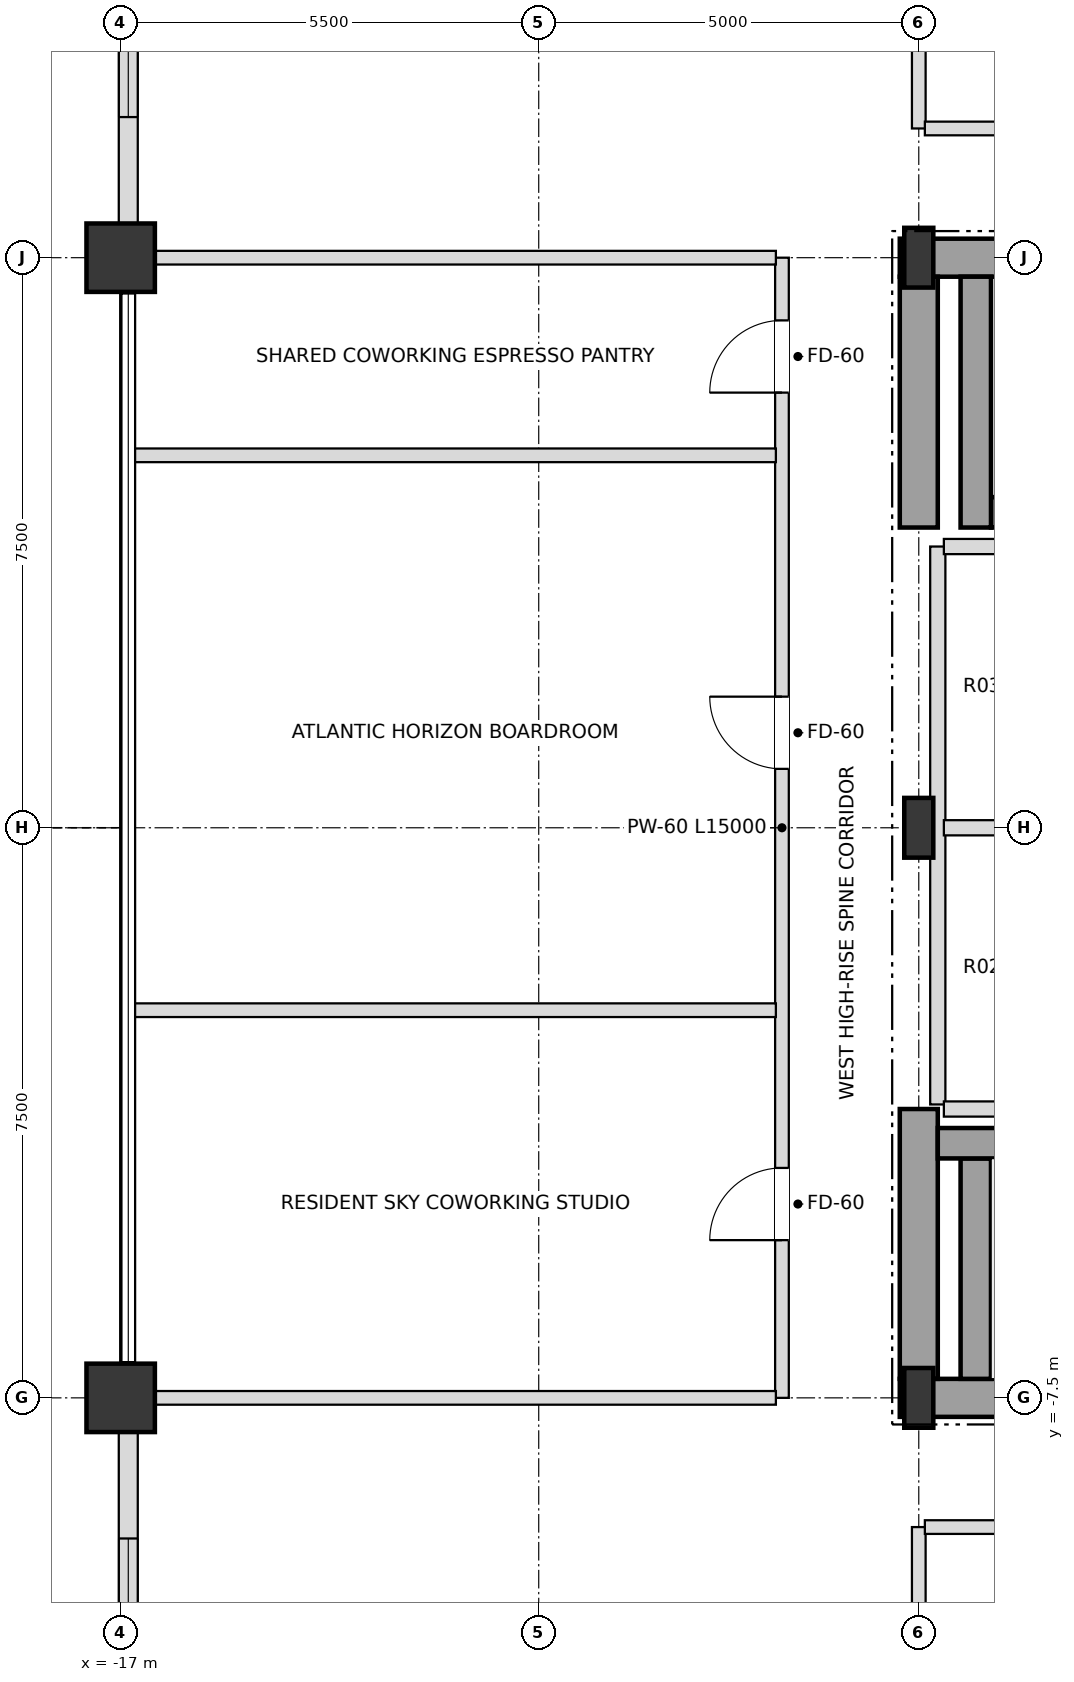
"""IFC4 building model, lengths in metres.
Left out: names, types, materials, properties, quantities, classifications, styles, units other than length and angle.
Written with IfcOpenShell. Run it as: python <this file> out.ifc"""

import sys

from ifc_helpers import new_model, si_unit, direction, frame, frame_2d, origin, origin_2d, place, context, subcontext, project, spatial, rectangle, i_section, extrude, element, fill, save


model = new_model("IFC4")
c1 = context("Model", 3, precision=1e-05, world=origin(), true_north=direction((0.0, 1.0)))
c2 = subcontext(c1, "Body", "Model", "MODEL_VIEW")
j1 = project(units=[si_unit("LENGTHUNIT", "METRE"), si_unit("PLANEANGLEUNIT", "RADIAN")], contexts=[c1])
p1 = place(None, origin())
s1 = spatial("IfcSite", under=j1, at=p1, CompositionType="ELEMENT")
p2 = place(p1, origin())
s2 = spatial("IfcBuilding", under=s1, at=p2, CompositionType="ELEMENT")
p3 = place(p2, frame((0.0, 0.0, 272.7)))
s3 = spatial("IfcBuildingStorey", under=s2, at=p3, CompositionType="ELEMENT", Elevation=272.7)
for number, where, z_axis, x_axis in (
    (1, (-6.5, -7.5, 0.0), (0.0, 0.0, 1.0), (1.0, 0.0, 0.0)),
    (2, (-6.5, 0.0, 0.0), (0.0, 0.0, 1.0), (1.0, 0.0, 0.0)),
    (3, (-6.5, 7.5, 0.0), (0.0, 0.0, 1.0), (1.0, 0.0, 0.0)),
):
    element("IfcColumn", number, at=place(p3, frame(where, z_axis=z_axis, x_axis=x_axis)), inside=s3, PredefinedType="COLUMN", context=c2, shape_type="SweptSolid", body=[
        extrude(i_section(OverallWidth=0.382, OverallDepth=0.786, WebThickness=0.02, FlangeThickness=0.033, at=origin_2d()), origin(), (0.0, 0.0, 1.0), 3.6),
    ])
for number, where, z_axis, x_axis in (
    (4, (-17.0, 7.5, 0.0), (0.0, 0.0, 1.0), (1.0, 0.0, 0.0)),
    (5, (-17.0, -7.5, 0.0), (0.0, 0.0, 1.0), (1.0, 0.0, 0.0)),
):
    element("IfcColumn", number, at=place(p3, frame(where, z_axis=z_axis, x_axis=x_axis)), inside=s3, PredefinedType="USERDEFINED", context=c2, shape_type="SweptSolid", body=[
        extrude(rectangle(XDim=0.9, YDim=0.9, at=origin_2d()), origin(), (0.0, 0.0, 1.0), 3.6),
    ])
p4 = place(p3, frame((-16.9, 12.555, 0.0), z_axis=(0.0, 0.0, 1.0), x_axis=(0.0, -1.0, 0.0)))
e6 = element("IfcWall", 6, at=p4, inside=s3, PredefinedType="SOLIDWALL", context=c2, shape_type="SweptSolid", body=[
    extrude(rectangle(XDim=4.61, YDim=0.25, at=frame_2d((2.305, 0.0))), origin(), (0.0, 0.0, 1.0), 2.748),
])
p5 = place(p4, frame((1.405, 0.0, 0.72)))
e7 = element("IfcOpeningElement", 7, at=p5, cuts=e6, PredefinedType="OPENING", context=c2, shape_type="SweptSolid", body=[
    extrude(rectangle(XDim=1.8, YDim=1.68, at=frame_2d((0.9, 0.84))), frame((0.0, 0.135, 0.0), z_axis=(0.0, -1.0, 0.0), x_axis=(1.0, 0.0, 0.0)), (0.0, 0.0, 1.0), 0.27),
])
p6 = place(p3, frame((-16.9, -7.945, 0.0), z_axis=(0.0, 0.0, 1.0), x_axis=(0.0, -1.0, 0.0)))
e8 = element("IfcWall", 8, at=p6, inside=s3, PredefinedType="SOLIDWALL", context=c2, shape_type="SweptSolid", body=[
    extrude(rectangle(XDim=4.61, YDim=0.25, at=frame_2d((2.305, 0.0))), origin(), (0.0, 0.0, 1.0), 2.748),
])
p7 = place(p6, frame((1.405, 0.0, 0.72)))
e9 = element("IfcOpeningElement", 9, at=p7, cuts=e8, PredefinedType="OPENING", context=c2, shape_type="SweptSolid", body=[
    extrude(rectangle(XDim=1.8, YDim=1.68, at=frame_2d((0.9, 0.84))), frame((0.0, 0.135, 0.0), z_axis=(0.0, -1.0, 0.0), x_axis=(1.0, 0.0, 0.0)), (0.0, 0.0, 1.0), 0.27),
])
p8 = place(p3, frame((-6.75, -7.5, 0.0), z_axis=(0.0, 0.0, 1.0), x_axis=(1.0, 0.0, 0.0)))
e10 = element("IfcWall", 10, at=p8, inside=s3, PredefinedType="SHEAR", context=c2, shape_type="SweptSolid", body=[
    extrude(rectangle(XDim=6.75, YDim=0.5, at=frame_2d((3.375, 0.0))), origin(), (0.0, 0.0, 1.0), 3.38),
])
p9 = place(p3, frame((-6.75, 7.5, 0.0), z_axis=(0.0, 0.0, 1.0), x_axis=(1.0, 0.0, 0.0)))
e11 = element("IfcWall", 11, at=p9, inside=s3, PredefinedType="SHEAR", context=c2, shape_type="SweptSolid", body=[
    extrude(rectangle(XDim=6.75, YDim=0.5, at=frame_2d((3.375, 0.0))), origin(), (0.0, 0.0, 1.0), 3.38),
])
p10 = place(p9, frame((1.65, 0.0, 0.0)))
e12 = element("IfcOpeningElement", 12, at=p10, cuts=e11, PredefinedType="OPENING", context=c2, shape_type="SweptSolid", body=[
    extrude(rectangle(XDim=1.05, YDim=2.15, at=frame_2d((0.525, 1.075))), frame((0.0, 0.26, 0.0), z_axis=(0.0, -1.0, 0.0), x_axis=(1.0, 0.0, 0.0)), (0.0, 0.0, 1.0), 0.52),
])
p11 = place(p3, frame((-6.5, -7.25, 0.0), z_axis=(0.0, 0.0, 1.0), x_axis=(0.0, 1.0, 0.0)))
e13 = element("IfcWall", 13, at=p11, inside=s3, PredefinedType="SHEAR", context=c2, shape_type="SweptSolid", body=[
    extrude(rectangle(XDim=3.55, YDim=0.5, at=frame_2d((1.775, 0.0))), origin(), (0.0, 0.0, 1.0), 3.38),
])
p12 = place(p3, frame((-6.5, 3.95, 0.0), z_axis=(0.0, 0.0, 1.0), x_axis=(0.0, 1.0, 0.0)))
e14 = element("IfcWall", 14, at=p12, inside=s3, PredefinedType="SHEAR", context=c2, shape_type="SweptSolid", body=[
    extrude(rectangle(XDim=3.3, YDim=0.5, at=frame_2d((1.65, 0.0))), origin(), (0.0, 0.0, 1.0), 3.38),
])
p13 = place(p3, frame((-5.75, -7.25, 0.0), z_axis=(0.0, 0.0, 1.0), x_axis=(0.0, 1.0, 0.0)))
e15 = element("IfcWall", 15, at=p13, inside=s3, PredefinedType="SHEAR", context=c2, shape_type="SweptSolid", body=[
    extrude(rectangle(XDim=2.9, YDim=0.4, at=frame_2d((1.45, 0.0))), origin(), (0.0, 0.0, 1.0), 3.38),
])
p14 = place(p3, frame((-6.25, -4.15, 0.0), z_axis=(0.0, 0.0, 1.0), x_axis=(1.0, 0.0, 0.0)))
e16 = element("IfcWall", 16, at=p14, inside=s3, PredefinedType="SHEAR", context=c2, shape_type="SweptSolid", body=[
    extrude(rectangle(XDim=7.78, YDim=0.4, at=frame_2d((3.89, 0.0))), origin(), (0.0, 0.0, 1.0), 3.38),
])
p15 = place(p3, frame((-5.55, 4.15, 0.0), z_axis=(0.0, 0.0, 1.0), x_axis=(1.0, 0.0, 0.0)))
e17 = element("IfcWall", 17, at=p15, inside=s3, PredefinedType="SHEAR", context=c2, shape_type="SweptSolid", body=[
    extrude(rectangle(XDim=7.08, YDim=0.4, at=frame_2d((3.54, 0.0))), origin(), (0.0, 0.0, 1.0), 3.38),
])
p16 = place(p3, frame((-5.75, 3.95, 0.0), z_axis=(0.0, 0.0, 1.0), x_axis=(0.0, 1.0, 0.0)))
e18 = element("IfcWall", 18, at=p16, inside=s3, PredefinedType="SHEAR", context=c2, shape_type="SweptSolid", body=[
    extrude(rectangle(XDim=3.3, YDim=0.4, at=frame_2d((1.65, 0.0))), origin(), (0.0, 0.0, 1.0), 3.38),
])
p17 = place(p3, frame((-8.3, -7.5, 0.0), z_axis=(0.0, 0.0, 1.0), x_axis=(0.0, 1.0, 0.0)))
e19 = element("IfcWall", 19, at=p17, inside=s3, PredefinedType="PARTITIONING", context=c2, shape_type="SweptSolid", body=[
    extrude(rectangle(XDim=15.0, YDim=0.18, at=frame_2d((7.5, 0.0))), origin(), (0.0, 0.0, 1.0), 3.38),
])
p18 = place(p17, frame((2.075, 0.0, 0.0)))
e20 = element("IfcOpeningElement", 20, at=p18, cuts=e19, PredefinedType="OPENING", context=c2, shape_type="SweptSolid", body=[
    extrude(rectangle(XDim=0.95, YDim=2.15, at=frame_2d((0.475, 1.075))), frame((0.0, 0.1, 0.0), z_axis=(0.0, -1.0, 0.0), x_axis=(1.0, 0.0, 0.0)), (0.0, 0.0, 1.0), 0.2),
])
p19 = place(p17, frame((8.275, 0.0, 0.0)))
e21 = element("IfcOpeningElement", 21, at=p19, cuts=e19, PredefinedType="OPENING", context=c2, shape_type="SweptSolid", body=[
    extrude(rectangle(XDim=0.95, YDim=2.15, at=frame_2d((0.475, 1.075))), frame((0.0, 0.1, 0.0), z_axis=(0.0, -1.0, 0.0), x_axis=(1.0, 0.0, 0.0)), (0.0, 0.0, 1.0), 0.2),
])
p20 = place(p17, frame((13.225, 0.0, 0.0)))
e22 = element("IfcOpeningElement", 22, at=p20, cuts=e19, PredefinedType="OPENING", context=c2, shape_type="SweptSolid", body=[
    extrude(rectangle(XDim=0.95, YDim=2.15, at=frame_2d((0.475, 1.075))), frame((0.0, 0.1, 0.0), z_axis=(0.0, -1.0, 0.0), x_axis=(1.0, 0.0, 0.0)), (0.0, 0.0, 1.0), 0.2),
])
for number, where, z_axis, x_axis in (
    (23, (-6.5, -19.9, 0.0), (0.0, 0.0, 1.0), (0.0, 1.0, 0.0)),
    (24, (-6.5, 9.2, 0.0), (0.0, 0.0, 1.0), (0.0, 1.0, 0.0)),
):
    element("IfcWall", number, at=place(p3, frame(where, z_axis=z_axis, x_axis=x_axis)), inside=s3, PredefinedType="PARTITIONING", context=c2, shape_type="SweptSolid", body=[
        extrude(rectangle(XDim=10.7, YDim=0.18, at=frame_2d((5.35, 0.0))), origin(), (0.0, 0.0, 1.0), 2.826),
    ])
p21 = place(p3, frame((-6.25, -3.64, 0.0), z_axis=(0.0, 0.0, 1.0), x_axis=(0.0, 1.0, 0.0)))
e25 = element("IfcWall", 25, at=p21, inside=s3, PredefinedType="SOLIDWALL", context=c2, shape_type="SweptSolid", body=[
    extrude(rectangle(XDim=7.34, YDim=0.2, at=frame_2d((3.67, 0.0))), origin(), (0.0, 0.0, 1.0), 3.38),
])
p22 = place(p3, frame((-6.42, -9.2, 0.0), z_axis=(0.0, 0.0, 1.0), x_axis=(1.0, 0.0, 0.0)))
e26 = element("IfcWall", 26, at=p22, inside=s3, PredefinedType="PARTITIONING", context=c2, shape_type="SweptSolid", body=[
    extrude(rectangle(XDim=7.34, YDim=0.18, at=frame_2d((3.67, 0.0))), origin(), (0.0, 0.0, 1.0), 3.38),
])
p23 = place(p22, frame((3.205, 0.0, 0.0)))
e27 = element("IfcOpeningElement", 27, at=p23, cuts=e26, PredefinedType="OPENING", context=c2, shape_type="SweptSolid", body=[
    extrude(rectangle(XDim=0.95, YDim=2.15, at=frame_2d((0.475, 1.075))), frame((0.0, 0.1, 0.0), z_axis=(0.0, -1.0, 0.0), x_axis=(1.0, 0.0, 0.0)), (0.0, 0.0, 1.0), 0.2),
])
p24 = place(p3, frame((-16.9, -7.5, 0.0), z_axis=(0.0, 0.0, 1.0), x_axis=(1.0, 0.0, 0.0)))
e28 = element("IfcWall", 28, at=p24, inside=s3, PredefinedType="PARTITIONING", context=c2, shape_type="SweptSolid", body=[
    extrude(rectangle(XDim=8.52, YDim=0.18, at=frame_2d((4.26, 0.0))), origin(), (0.0, 0.0, 1.0), 2.826),
])
p25 = place(p3, frame((-6.17, -3.7, 0.0), z_axis=(0.0, 0.0, 1.0), x_axis=(1.0, 0.0, 0.0)))
e29 = element("IfcWall", 29, at=p25, inside=s3, PredefinedType="SOLIDWALL", context=c2, shape_type="SweptSolid", body=[
    extrude(rectangle(XDim=1.94, YDim=0.2, at=frame_2d((0.97, 0.0))), origin(), (0.0, 0.0, 1.0), 3.38),
])
p26 = place(p3, frame((-16.82, -2.4, 0.0), z_axis=(0.0, 0.0, 1.0), x_axis=(1.0, 0.0, 0.0)))
e30 = element("IfcWall", 30, at=p26, inside=s3, PredefinedType="PARTITIONING", context=c2, shape_type="SweptSolid", body=[
    extrude(rectangle(XDim=8.44, YDim=0.18, at=frame_2d((4.22, 0.0))), origin(), (0.0, 0.0, 1.0), 3.018),
])
for number, where, z_axis, x_axis in (
    (31, (-6.17, 0.0, 0.0), (0.0, 0.0, 1.0), (1.0, 0.0, 0.0)),
    (32, (-6.17, 3.7, 0.0), (0.0, 0.0, 1.0), (1.0, 0.0, 0.0)),
):
    element("IfcWall", number, at=place(p3, frame(where, z_axis=z_axis, x_axis=x_axis)), inside=s3, PredefinedType="SOLIDWALL", context=c2, shape_type="SweptSolid", body=[
        extrude(rectangle(XDim=1.94, YDim=0.2, at=frame_2d((0.97, 0.0))), origin(), (0.0, 0.0, 1.0), 3.38),
    ])
p27 = place(p3, frame((-16.82, 4.9, 0.0), z_axis=(0.0, 0.0, 1.0), x_axis=(1.0, 0.0, 0.0)))
e33 = element("IfcWall", 33, at=p27, inside=s3, PredefinedType="PARTITIONING", context=c2, shape_type="SweptSolid", body=[
    extrude(rectangle(XDim=8.44, YDim=0.18, at=frame_2d((4.22, 0.0))), origin(), (0.0, 0.0, 1.0), 3.018),
])
p28 = place(p3, frame((-16.9, 7.5, 0.0), z_axis=(0.0, 0.0, 1.0), x_axis=(1.0, 0.0, 0.0)))
e34 = element("IfcWall", 34, at=p28, inside=s3, PredefinedType="PARTITIONING", context=c2, shape_type="SweptSolid", body=[
    extrude(rectangle(XDim=8.52, YDim=0.18, at=frame_2d((4.26, 0.0))), origin(), (0.0, 0.0, 1.0), 2.826),
])
p29 = place(p3, frame((-6.42, 9.2, 0.0), z_axis=(0.0, 0.0, 1.0), x_axis=(1.0, 0.0, 0.0)))
e35 = element("IfcWall", 35, at=p29, inside=s3, PredefinedType="PARTITIONING", context=c2, shape_type="SweptSolid", body=[
    extrude(rectangle(XDim=7.34, YDim=0.18, at=frame_2d((3.67, 0.0))), origin(), (0.0, 0.0, 1.0), 3.38),
])
p30 = place(p29, frame((3.205, 0.0, 0.0)))
e36 = element("IfcOpeningElement", 36, at=p30, cuts=e35, PredefinedType="OPENING", context=c2, shape_type="SweptSolid", body=[
    extrude(rectangle(XDim=0.95, YDim=2.15, at=frame_2d((0.475, 1.075))), frame((0.0, 0.1, 0.0), z_axis=(0.0, -1.0, 0.0), x_axis=(1.0, 0.0, 0.0)), (0.0, 0.0, 1.0), 0.2),
])
p31 = place(p5, origin())
e37 = element("IfcWindow", 37, at=p31, inside=s3, PartitioningType="SINGLE_PANEL", PredefinedType="WINDOW", context=c2, shape_type="SweptSolid", body=[
    extrude(rectangle(XDim=1.8, YDim=1.68, at=frame_2d((0.9, 0.84))), frame((0.0, 0.03, 0.0), z_axis=(0.0, -1.0, 0.0), x_axis=(1.0, 0.0, 0.0)), (0.0, 0.0, 1.0), 0.06),
])
fill(e7, e37)
p32 = place(p7, origin())
e38 = element("IfcWindow", 38, at=p32, inside=s3, PartitioningType="SINGLE_PANEL", PredefinedType="WINDOW", context=c2, shape_type="SweptSolid", body=[
    extrude(rectangle(XDim=1.8, YDim=1.68, at=frame_2d((0.9, 0.84))), frame((0.0, 0.03, 0.0), z_axis=(0.0, -1.0, 0.0), x_axis=(1.0, 0.0, 0.0)), (0.0, 0.0, 1.0), 0.06),
])
fill(e9, e38)
p33 = place(p18, origin())
e39 = element("IfcDoor", 39, at=p33, inside=s3, OperationType="SINGLE_SWING_LEFT", PredefinedType="DOOR", context=c2, shape_type="SweptSolid", body=[
    extrude(rectangle(XDim=0.95, YDim=2.15, at=frame_2d((0.475, 1.075))), frame((0.0, 0.025, 0.0), z_axis=(0.0, -1.0, 0.0), x_axis=(1.0, 0.0, 0.0)), (0.0, 0.0, 1.0), 0.05),
])
fill(e20, e39)
p34 = place(p19, origin())
e40 = element("IfcDoor", 40, at=p34, inside=s3, OperationType="SINGLE_SWING_RIGHT", PredefinedType="DOOR", context=c2, shape_type="SweptSolid", body=[
    extrude(rectangle(XDim=0.95, YDim=2.15, at=frame_2d((0.475, 1.075))), frame((0.0, 0.025, 0.0), z_axis=(0.0, -1.0, 0.0), x_axis=(1.0, 0.0, 0.0)), (0.0, 0.0, 1.0), 0.05),
])
fill(e21, e40)
p35 = place(p20, origin())
e41 = element("IfcDoor", 41, at=p35, inside=s3, OperationType="SINGLE_SWING_LEFT", PredefinedType="DOOR", context=c2, shape_type="SweptSolid", body=[
    extrude(rectangle(XDim=0.95, YDim=2.15, at=frame_2d((0.475, 1.075))), frame((0.0, 0.025, 0.0), z_axis=(0.0, -1.0, 0.0), x_axis=(1.0, 0.0, 0.0)), (0.0, 0.0, 1.0), 0.05),
])
fill(e22, e41)
save(model, sys.argv[1])
